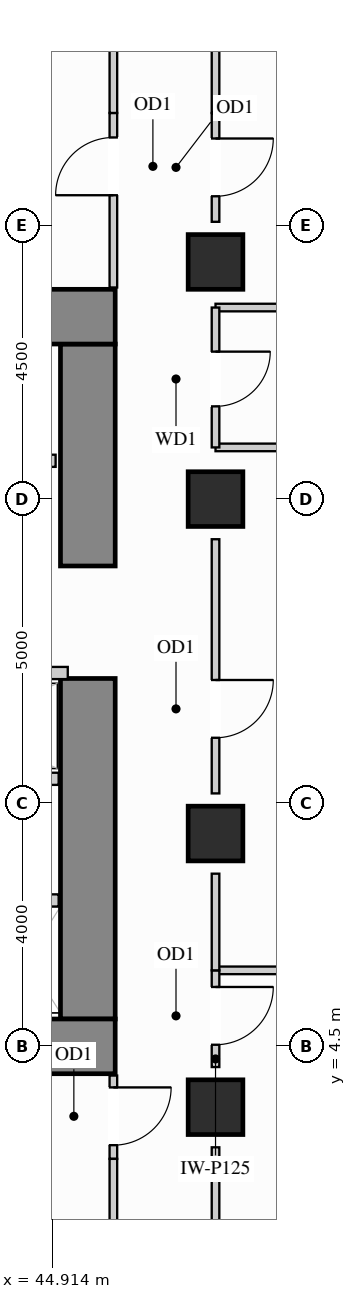
"""IFC4 building model, lengths in metres.
Left out: names, types, materials, properties, quantities, classifications, styles, units other than length and angle.
Written with IfcOpenShell. Run it as: python <this file> out.ifc"""

import sys

from ifc_helpers import new_model, si_unit, direction, frame, frame_2d, origin, origin_2d, place, context, subcontext, project, spatial, rectangle, extrude, source, transform, mapped, element, fill, save


model = new_model("IFC4")
c1 = context("Model", 3, precision=1e-05, world=origin(), true_north=direction((0.0, 1.0)))
c2 = subcontext(c1, "Body", "Model", "MODEL_VIEW")
j1 = project(units=[si_unit("LENGTHUNIT", "METRE"), si_unit("PLANEANGLEUNIT", "RADIAN")], contexts=[c1])
p1 = place(None, origin())
s1 = spatial("IfcSite", under=j1, at=p1, CompositionType="ELEMENT")
p2 = place(p1, origin())
s2 = spatial("IfcBuilding", under=s1, at=p2, CompositionType="ELEMENT")
p3 = place(p2, frame((0.0, 0.0, 33.3)))
s3 = spatial("IfcBuildingStorey", under=s2, at=p3, CompositionType="ELEMENT", Elevation=33.3)
m1 = source(origin(), c2, "Body", "SweptSolid", [
    extrude(rectangle(XDim=0.9, YDim=0.9, at=origin_2d()), origin(), (0.0, 0.0, 1.0), 3.38),
])
for number, where, z_axis, x_axis in (
    (1, (47.6, 13.5, 0.0), (0.0, 0.0, 1.0), (1.0, 0.0, 0.0)),
    (2, (47.6, 3.5, 0.0), (0.0, 0.0, 1.0), (1.0, 0.0, 0.0)),
    (3, (47.6, 8.0, 0.0), (0.0, 0.0, 1.0), (1.0, 0.0, 0.0)),
    (4, (47.6, 17.4, 0.0), (0.0, 0.0, 1.0), (1.0, 0.0, 0.0)),
):
    element("IfcColumn", number, at=place(p3, frame(where, z_axis=z_axis, x_axis=x_axis)), inside=s3, PredefinedType="COLUMN", context=c2, shape_type="MappedRepresentation", body=[
        mapped(m1, transform((0.0, 0.0, 0.0), x_axis=(1.0, 0.0, 0.0), y_axis=(0.0, 1.0, 0.0), z_axis=(0.0, 0.0, 1.0))),
    ])
m2 = source(origin(), c2, "Body", "SweptSolid", [
    extrude(rectangle(XDim=5.6, YDim=0.9, at=frame_2d((2.8, 0.0))), origin(), (0.0, 0.0, 1.0), 3.38),
])
p4 = place(p3, frame((45.5, 4.95, 0.0), z_axis=(0.0, 0.0, 1.0), x_axis=(0.0, 1.0, 0.0)))
e5 = element("IfcWall", 5, at=p4, inside=s3, PredefinedType="SHEAR", context=c2, shape_type="MappedRepresentation", body=[
    mapped(m2, transform((0.0, 0.0, 0.0), x_axis=(1.0, 0.0, 0.0), y_axis=(0.0, 1.0, 0.0), z_axis=(0.0, 0.0, 1.0))),
])
m3 = source(origin(), c2, "Body", "SweptSolid", [
    extrude(rectangle(XDim=3.65, YDim=0.9, at=frame_2d((1.825, 0.0))), origin(), (0.0, 0.0, 1.0), 3.38),
])
p5 = place(p3, frame((45.5, 12.4, 0.0), z_axis=(0.0, 0.0, 1.0), x_axis=(0.0, 1.0, 0.0)))
e6 = element("IfcWall", 6, at=p5, inside=s3, PredefinedType="SHEAR", context=c2, shape_type="MappedRepresentation", body=[
    mapped(m3, transform((0.0, 0.0, 0.0), x_axis=(1.0, 0.0, 0.0), y_axis=(0.0, 1.0, 0.0), z_axis=(0.0, 0.0, 1.0))),
])
m4 = source(origin(), c2, "Body", "SweptSolid", [
    extrude(rectangle(XDim=10.4, YDim=0.9, at=frame_2d((5.2, 0.0))), origin(), (0.0, 0.0, 1.0), 3.38),
])
for number, where, z_axis, x_axis in (
    (7, (35.55, 16.5, 0.0), (0.0, 0.0, 1.0), (1.0, 0.0, 0.0)),
    (8, (35.55, 4.5, 0.0), (0.0, 0.0, 1.0), (1.0, 0.0, 0.0)),
):
    element("IfcWall", number, at=place(p3, frame(where, z_axis=z_axis, x_axis=x_axis)), inside=s3, PredefinedType="SHEAR", context=c2, shape_type="MappedRepresentation", body=[
        mapped(m4, transform((0.0, 0.0, 0.0), x_axis=(1.0, 0.0, 0.0), y_axis=(0.0, 1.0, 0.0), z_axis=(0.0, 0.0, 1.0))),
    ])
m5 = source(origin(), c2, "Body", "SweptSolid", [
    extrude(rectangle(XDim=11.048, YDim=0.125, at=frame_2d((5.524, 0.0))), origin(), (0.0, 0.0, 1.0), 3.365),
])
p6 = place(p3, frame((47.6, 14.35, 0.0), z_axis=(0.0, 0.0, 1.0), x_axis=(1.0, 0.0, 0.0)))
e9 = element("IfcWall", 9, at=p6, inside=s3, PredefinedType="PARTITIONING", context=c2, shape_type="MappedRepresentation", body=[
    mapped(m5, transform((0.0, 0.0, 0.0), x_axis=(1.0, 0.0, 0.0), y_axis=(0.0, 1.0, 0.0), z_axis=(0.0, 0.0, 1.0))),
])
m6 = source(origin(), c2, "Body", "SweptSolid", [
    extrude(rectangle(XDim=11.048, YDim=0.125, at=frame_2d((5.524, 0.0))), origin(), (0.0, 0.0, 1.0), 2.67),
])
p7 = place(p3, frame((47.6, 16.65, 0.0), z_axis=(0.0, 0.0, 1.0), x_axis=(1.0, 0.0, 0.0)))
e10 = element("IfcWall", 10, at=p7, inside=s3, PredefinedType="PARTITIONING", context=c2, shape_type="MappedRepresentation", body=[
    mapped(m6, transform((0.0, 0.0, 0.0), x_axis=(1.0, 0.0, 0.0), y_axis=(0.0, 1.0, 0.0), z_axis=(0.0, 0.0, 1.0))),
])
p8 = place(p3, frame((47.6, 5.75, 0.0), z_axis=(0.0, 0.0, 1.0), x_axis=(1.0, 0.0, 0.0)))
e11 = element("IfcWall", 11, at=p8, inside=s3, PredefinedType="PARTITIONING", context=c2, shape_type="MappedRepresentation", body=[
    mapped(m5, transform((0.0, 0.0, 0.0), x_axis=(1.0, 0.0, 0.0), y_axis=(0.0, 1.0, 0.0), z_axis=(0.0, 0.0, 1.0))),
])
p9 = place(p3, frame((47.6, 4.16, 0.0), z_axis=(0.0, 0.0, 1.0), x_axis=(0.0, 1.0, 0.0)))
e12 = element("IfcWall", 12, at=p9, inside=s3, PredefinedType="PARTITIONING", context=c2, shape_type="SweptSolid", body=[
    extrude(rectangle(XDim=1.59, YDim=0.125, at=frame_2d((0.795, 0.0))), origin(), (0.0, 0.0, 1.0), 2.67),
])
p10 = place(p9, frame((0.367, 0.0, 0.0)))
e13 = element("IfcOpeningElement", 13, at=p10, cuts=e12, PredefinedType="OPENING", context=c2, shape_type="SweptSolid", body=[
    extrude(rectangle(XDim=0.95, YDim=2.15, at=frame_2d((0.475, 1.075))), frame((0.0, 0.073, 0.0), z_axis=(0.0, -1.0, 0.0), x_axis=(1.0, 0.0, 0.0)), (0.0, 0.0, 1.0), 0.145),
])
m7 = source(origin(), c2, "Body", "SweptSolid", [
    extrude(rectangle(XDim=1.58, YDim=0.125, at=frame_2d((0.79, 0.0))), origin(), (0.0, 0.0, 1.0), 2.67),
])
p11 = place(p3, frame((47.6, 1.26, 0.0), z_axis=(0.0, 0.0, 1.0), x_axis=(0.0, 1.0, 0.0)))
e14 = element("IfcWall", 14, at=p11, inside=s3, PredefinedType="PARTITIONING", context=c2, shape_type="MappedRepresentation", body=[
    mapped(m7, transform((0.0, 0.0, 0.0), x_axis=(1.0, 0.0, 0.0), y_axis=(0.0, 1.0, 0.0), z_axis=(0.0, 0.0, 1.0))),
])
m8 = source(origin(), c2, "Body", "SweptSolid", [
    extrude(rectangle(XDim=1.59, YDim=0.125, at=frame_2d((0.795, 0.0))), origin(), (0.0, 0.0, 1.0), 2.67),
])
p12 = place(p3, frame((47.6, 5.75, 0.0), z_axis=(0.0, 0.0, 1.0), x_axis=(0.0, 1.0, 0.0)))
e15 = element("IfcWall", 15, at=p12, inside=s3, PredefinedType="PARTITIONING", context=c2, shape_type="MappedRepresentation", body=[
    mapped(m8, transform((0.0, 0.0, 0.0), x_axis=(1.0, 0.0, 0.0), y_axis=(0.0, 1.0, 0.0), z_axis=(0.0, 0.0, 1.0))),
])
p13 = place(p3, frame((47.6, 8.66, 0.0), z_axis=(0.0, 0.0, 1.0), x_axis=(0.0, 1.0, 0.0)))
e16 = element("IfcWall", 16, at=p13, inside=s3, PredefinedType="PARTITIONING", context=c2, shape_type="SweptSolid", body=[
    extrude(rectangle(XDim=4.18, YDim=0.125, at=frame_2d((2.09, 0.0))), origin(), (0.0, 0.0, 1.0), 2.67),
])
p14 = place(p13, frame((0.915, 0.0, 0.0)))
e17 = element("IfcOpeningElement", 17, at=p14, cuts=e16, PredefinedType="OPENING", context=c2, shape_type="SweptSolid", body=[
    extrude(rectangle(XDim=0.95, YDim=2.15, at=frame_2d((0.475, 1.075))), frame((0.0, 0.073, 0.0), z_axis=(0.0, -1.0, 0.0), x_axis=(1.0, 0.0, 0.0)), (0.0, 0.0, 1.0), 0.145),
])
p15 = place(p3, frame((47.6, 18.06, 0.0), z_axis=(0.0, 0.0, 1.0), x_axis=(0.0, 1.0, 0.0)))
e18 = element("IfcWall", 18, at=p15, inside=s3, PredefinedType="PARTITIONING", context=c2, shape_type="SweptSolid", body=[
    extrude(rectangle(XDim=1.79, YDim=0.125, at=frame_2d((0.895, 0.0))), origin(), (0.0, 0.0, 1.0), 2.67),
])
p16 = place(p15, frame((0.42, 0.0, 0.0)))
e19 = element("IfcOpeningElement", 19, at=p16, cuts=e18, PredefinedType="OPENING", context=c2, shape_type="SweptSolid", body=[
    extrude(rectangle(XDim=0.95, YDim=2.15, at=frame_2d((0.475, 1.075))), frame((0.0, 0.073, 0.0), z_axis=(0.0, -1.0, 0.0), x_axis=(1.0, 0.0, 0.0)), (0.0, 0.0, 1.0), 0.145),
])
m9 = source(origin(), c2, "Body", "SweptSolid", [
    extrude(rectangle(XDim=1.39, YDim=0.125, at=frame_2d((0.695, 0.0))), origin(), (0.0, 0.0, 1.0), 2.67),
])
p17 = place(p3, frame((47.6, 19.85, 0.0), z_axis=(0.0, 0.0, 1.0), x_axis=(0.0, 1.0, 0.0)))
e20 = element("IfcWall", 20, at=p17, inside=s3, PredefinedType="PARTITIONING", context=c2, shape_type="MappedRepresentation", body=[
    mapped(m9, transform((0.0, 0.0, 0.0), x_axis=(1.0, 0.0, 0.0), y_axis=(0.0, 1.0, 0.0), z_axis=(0.0, 0.0, 1.0))),
])
p18 = place(p3, frame((47.6, 14.35, 0.0), z_axis=(0.0, 0.0, 1.0), x_axis=(0.0, 1.0, 0.0)))
e21 = element("IfcWall", 21, at=p18, inside=s3, PredefinedType="PARTITIONING", context=c2, shape_type="SweptSolid", body=[
    extrude(rectangle(XDim=2.3, YDim=0.125, at=frame_2d((1.15, 0.0))), origin(), (0.0, 0.0, 1.0), 2.67),
])
p19 = place(p18, frame((0.675, 0.0, 0.0)))
e22 = element("IfcOpeningElement", 22, at=p19, cuts=e21, PredefinedType="OPENING", context=c2, shape_type="SweptSolid", body=[
    extrude(rectangle(XDim=0.9, YDim=2.15, at=frame_2d((0.45, 1.075))), frame((0.0, 0.073, 0.0), z_axis=(0.0, -1.0, 0.0), x_axis=(1.0, 0.0, 0.0)), (0.0, 0.0, 1.0), 0.145),
])
p20 = place(p3, frame((45.92, 16.98, 0.0), z_axis=(0.0, 0.0, 1.0), x_axis=(0.0, 1.0, 0.0)))
e23 = element("IfcWall", 23, at=p20, inside=s3, PredefinedType="PARTITIONING", context=c2, shape_type="SweptSolid", body=[
    extrude(rectangle(XDim=2.87, YDim=0.125, at=frame_2d((1.435, 0.0))), origin(), (0.0, 0.0, 1.0), 3.365),
])
p21 = place(p20, frame((1.517, 0.0, 0.0)))
e24 = element("IfcOpeningElement", 24, at=p21, cuts=e23, PredefinedType="OPENING", context=c2, shape_type="SweptSolid", body=[
    extrude(rectangle(XDim=0.95, YDim=2.15, at=frame_2d((0.475, 1.075))), frame((0.0, 0.073, 0.0), z_axis=(0.0, -1.0, 0.0), x_axis=(1.0, 0.0, 0.0)), (0.0, 0.0, 1.0), 0.145),
])
m10 = source(origin(), c2, "Body", "SweptSolid", [
    extrude(rectangle(XDim=2.298, YDim=0.125, at=frame_2d((1.149, 0.0))), origin(), (0.0, 0.0, 1.0), 3.365),
])
p22 = place(p3, frame((45.92, 19.85, 0.0), z_axis=(0.0, 0.0, 1.0), x_axis=(0.0, 1.0, 0.0)))
e25 = element("IfcWall", 25, at=p22, inside=s3, PredefinedType="PARTITIONING", context=c2, shape_type="MappedRepresentation", body=[
    mapped(m10, transform((0.0, 0.0, 0.0), x_axis=(1.0, 0.0, 0.0), y_axis=(0.0, 1.0, 0.0), z_axis=(0.0, 0.0, 1.0))),
])
p23 = place(p3, frame((45.92, 2.65, 0.0), z_axis=(0.0, 0.0, 1.0), x_axis=(0.0, 1.0, 0.0)))
e26 = element("IfcWall", 26, at=p23, inside=s3, PredefinedType="PARTITIONING", context=c2, shape_type="SweptSolid", body=[
    extrude(rectangle(XDim=1.37, YDim=0.125, at=frame_2d((0.685, 0.0))), origin(), (0.0, 0.0, 1.0), 3.365),
])
p24 = place(p23, frame((0.225, 0.0, 0.0)))
e27 = element("IfcOpeningElement", 27, at=p24, cuts=e26, PredefinedType="OPENING", context=c2, shape_type="SweptSolid", body=[
    extrude(rectangle(XDim=0.95, YDim=2.15, at=frame_2d((0.475, 1.075))), frame((0.0, 0.073, 0.0), z_axis=(0.0, -1.0, 0.0), x_axis=(1.0, 0.0, 0.0)), (0.0, 0.0, 1.0), 0.145),
])
p25 = place(p3, frame((45.92, 0.352, 0.0), z_axis=(0.0, 0.0, 1.0), x_axis=(0.0, 1.0, 0.0)))
e28 = element("IfcWall", 28, at=p25, inside=s3, PredefinedType="PARTITIONING", context=c2, shape_type="MappedRepresentation", body=[
    mapped(m10, transform((0.0, 0.0, 0.0), x_axis=(1.0, 0.0, 0.0), y_axis=(0.0, 1.0, 0.0), z_axis=(0.0, 0.0, 1.0))),
])
m11 = source(origin(), c2, "Body", "SweptSolid", [
    extrude(rectangle(XDim=1.17, YDim=0.2, at=frame_2d((0.585, 0.0))), origin(), (0.0, 0.0, 1.0), 3.365),
])
p26 = place(p3, frame((43.85, 6.9, 0.0), z_axis=(0.0, 0.0, 1.0), x_axis=(1.0, 0.0, 0.0)))
e29 = element("IfcWall", 29, at=p26, inside=s3, PredefinedType="PARTITIONING", context=c2, shape_type="MappedRepresentation", body=[
    mapped(m11, transform((0.0, 0.0, 0.0), x_axis=(1.0, 0.0, 0.0), y_axis=(0.0, 1.0, 0.0), z_axis=(0.0, 0.0, 1.0))),
])
p27 = place(p3, frame((42.23, 14.13, 0.0), z_axis=(0.0, 0.0, 1.0), x_axis=(1.0, 0.0, 0.0)))
e30 = element("IfcWall", 30, at=p27, inside=s3, PredefinedType="PARTITIONING", context=c2, shape_type="SweptSolid", body=[
    extrude(rectangle(XDim=2.74, YDim=0.2, at=frame_2d((1.37, 0.0))), origin(), (0.0, 0.0, 1.0), 3.365),
])
p28 = place(p27, frame((0.82, 0.0, 0.0)))
e31 = element("IfcOpeningElement", 31, at=p28, cuts=e30, PredefinedType="OPENING", context=c2, shape_type="SweptSolid", body=[
    extrude(rectangle(XDim=1.1, YDim=2.2, at=frame_2d((0.55, 1.1))), frame((0.0, 0.11, 0.0), z_axis=(0.0, -1.0, 0.0), x_axis=(1.0, 0.0, 0.0)), (0.0, 0.0, 1.0), 0.22),
])
m12 = source(origin(), c2, "Body", "SweptSolid", [
    extrude(rectangle(XDim=3.49, YDim=0.2, at=frame_2d((1.745, 0.0))), origin(), (0.0, 0.0, 1.0), 3.365),
])
p29 = place(p3, frame((41.68, 10.64, 0.0), z_axis=(0.0, 0.0, 1.0), x_axis=(1.0, 0.0, 0.0)))
e32 = element("IfcWall", 32, at=p29, inside=s3, PredefinedType="PARTITIONING", context=c2, shape_type="MappedRepresentation", body=[
    mapped(m12, transform((0.0, 0.0, 0.0), x_axis=(1.0, 0.0, 0.0), y_axis=(0.0, 1.0, 0.0), z_axis=(0.0, 0.0, 1.0))),
])
m13 = source(origin(), c2, "Body", "SweptSolid", [
    extrude(rectangle(XDim=3.34, YDim=0.2, at=frame_2d((1.67, 0.0))), origin(), (0.0, 0.0, 1.0), 3.365),
])
p30 = place(p3, frame((41.68, 8.9, 0.0), z_axis=(0.0, 0.0, 1.0), x_axis=(1.0, 0.0, 0.0)))
e33 = element("IfcWall", 33, at=p30, inside=s3, PredefinedType="PARTITIONING", context=c2, shape_type="MappedRepresentation", body=[
    mapped(m13, transform((0.0, 0.0, 0.0), x_axis=(1.0, 0.0, 0.0), y_axis=(0.0, 1.0, 0.0), z_axis=(0.0, 0.0, 1.0))),
])
m14 = source(origin(), c2, "Body", "SweptSolid", [
    extrude(rectangle(XDim=0.95, YDim=2.15, at=frame_2d((0.475, 1.075))), frame((0.0, 0.025, 0.0), z_axis=(0.0, -1.0, 0.0), x_axis=(1.0, 0.0, 0.0)), (0.0, 0.0, 1.0), 0.05),
])
p31 = place(p21, origin())
e34 = element("IfcDoor", 34, at=p31, inside=s3, OperationType="SINGLE_SWING_LEFT", PredefinedType="DOOR", context=c2, shape_type="MappedRepresentation", body=[
    mapped(m14, transform((0.0, 0.0, 0.0), x_axis=(1.0, 0.0, 0.0), y_axis=(0.0, 1.0, 0.0), z_axis=(0.0, 0.0, 1.0))),
])
fill(e24, e34)
p32 = place(p24, origin())
e35 = element("IfcDoor", 35, at=p32, inside=s3, OperationType="SINGLE_SWING_RIGHT", PredefinedType="DOOR", context=c2, shape_type="MappedRepresentation", body=[
    mapped(m14, transform((0.0, 0.0, 0.0), x_axis=(1.0, 0.0, 0.0), y_axis=(0.0, 1.0, 0.0), z_axis=(0.0, 0.0, 1.0))),
])
fill(e27, e35)
p33 = place(p10, origin())
e36 = element("IfcDoor", 36, at=p33, inside=s3, OperationType="SINGLE_SWING_RIGHT", PredefinedType="DOOR", context=c2, shape_type="MappedRepresentation", body=[
    mapped(m14, transform((0.0, 0.0, 0.0), x_axis=(1.0, 0.0, 0.0), y_axis=(0.0, 1.0, 0.0), z_axis=(0.0, 0.0, 1.0))),
])
fill(e13, e36)
p34 = place(p14, origin())
e37 = element("IfcDoor", 37, at=p34, inside=s3, OperationType="SINGLE_SWING_RIGHT", PredefinedType="DOOR", context=c2, shape_type="MappedRepresentation", body=[
    mapped(m14, transform((0.0, 0.0, 0.0), x_axis=(1.0, 0.0, 0.0), y_axis=(0.0, 1.0, 0.0), z_axis=(0.0, 0.0, 1.0))),
])
fill(e17, e37)
p35 = place(p16, origin())
e38 = element("IfcDoor", 38, at=p35, inside=s3, OperationType="SINGLE_SWING_RIGHT", PredefinedType="DOOR", context=c2, shape_type="MappedRepresentation", body=[
    mapped(m14, transform((0.0, 0.0, 0.0), x_axis=(1.0, 0.0, 0.0), y_axis=(0.0, 1.0, 0.0), z_axis=(0.0, 0.0, 1.0))),
])
fill(e19, e38)
m15 = source(origin(), c2, "Body", "SweptSolid", [
    extrude(rectangle(XDim=0.9, YDim=2.15, at=frame_2d((0.45, 1.075))), frame((0.0, 0.025, 0.0), z_axis=(0.0, -1.0, 0.0), x_axis=(1.0, 0.0, 0.0)), (0.0, 0.0, 1.0), 0.05),
])
p36 = place(p19, origin())
e39 = element("IfcDoor", 39, at=p36, inside=s3, OperationType="SINGLE_SWING_RIGHT", PredefinedType="DOOR", context=c2, shape_type="MappedRepresentation", body=[
    mapped(m15, transform((0.0, 0.0, 0.0), x_axis=(1.0, 0.0, 0.0), y_axis=(0.0, 1.0, 0.0), z_axis=(0.0, 0.0, 1.0))),
])
fill(e22, e39)
save(model, sys.argv[1])
